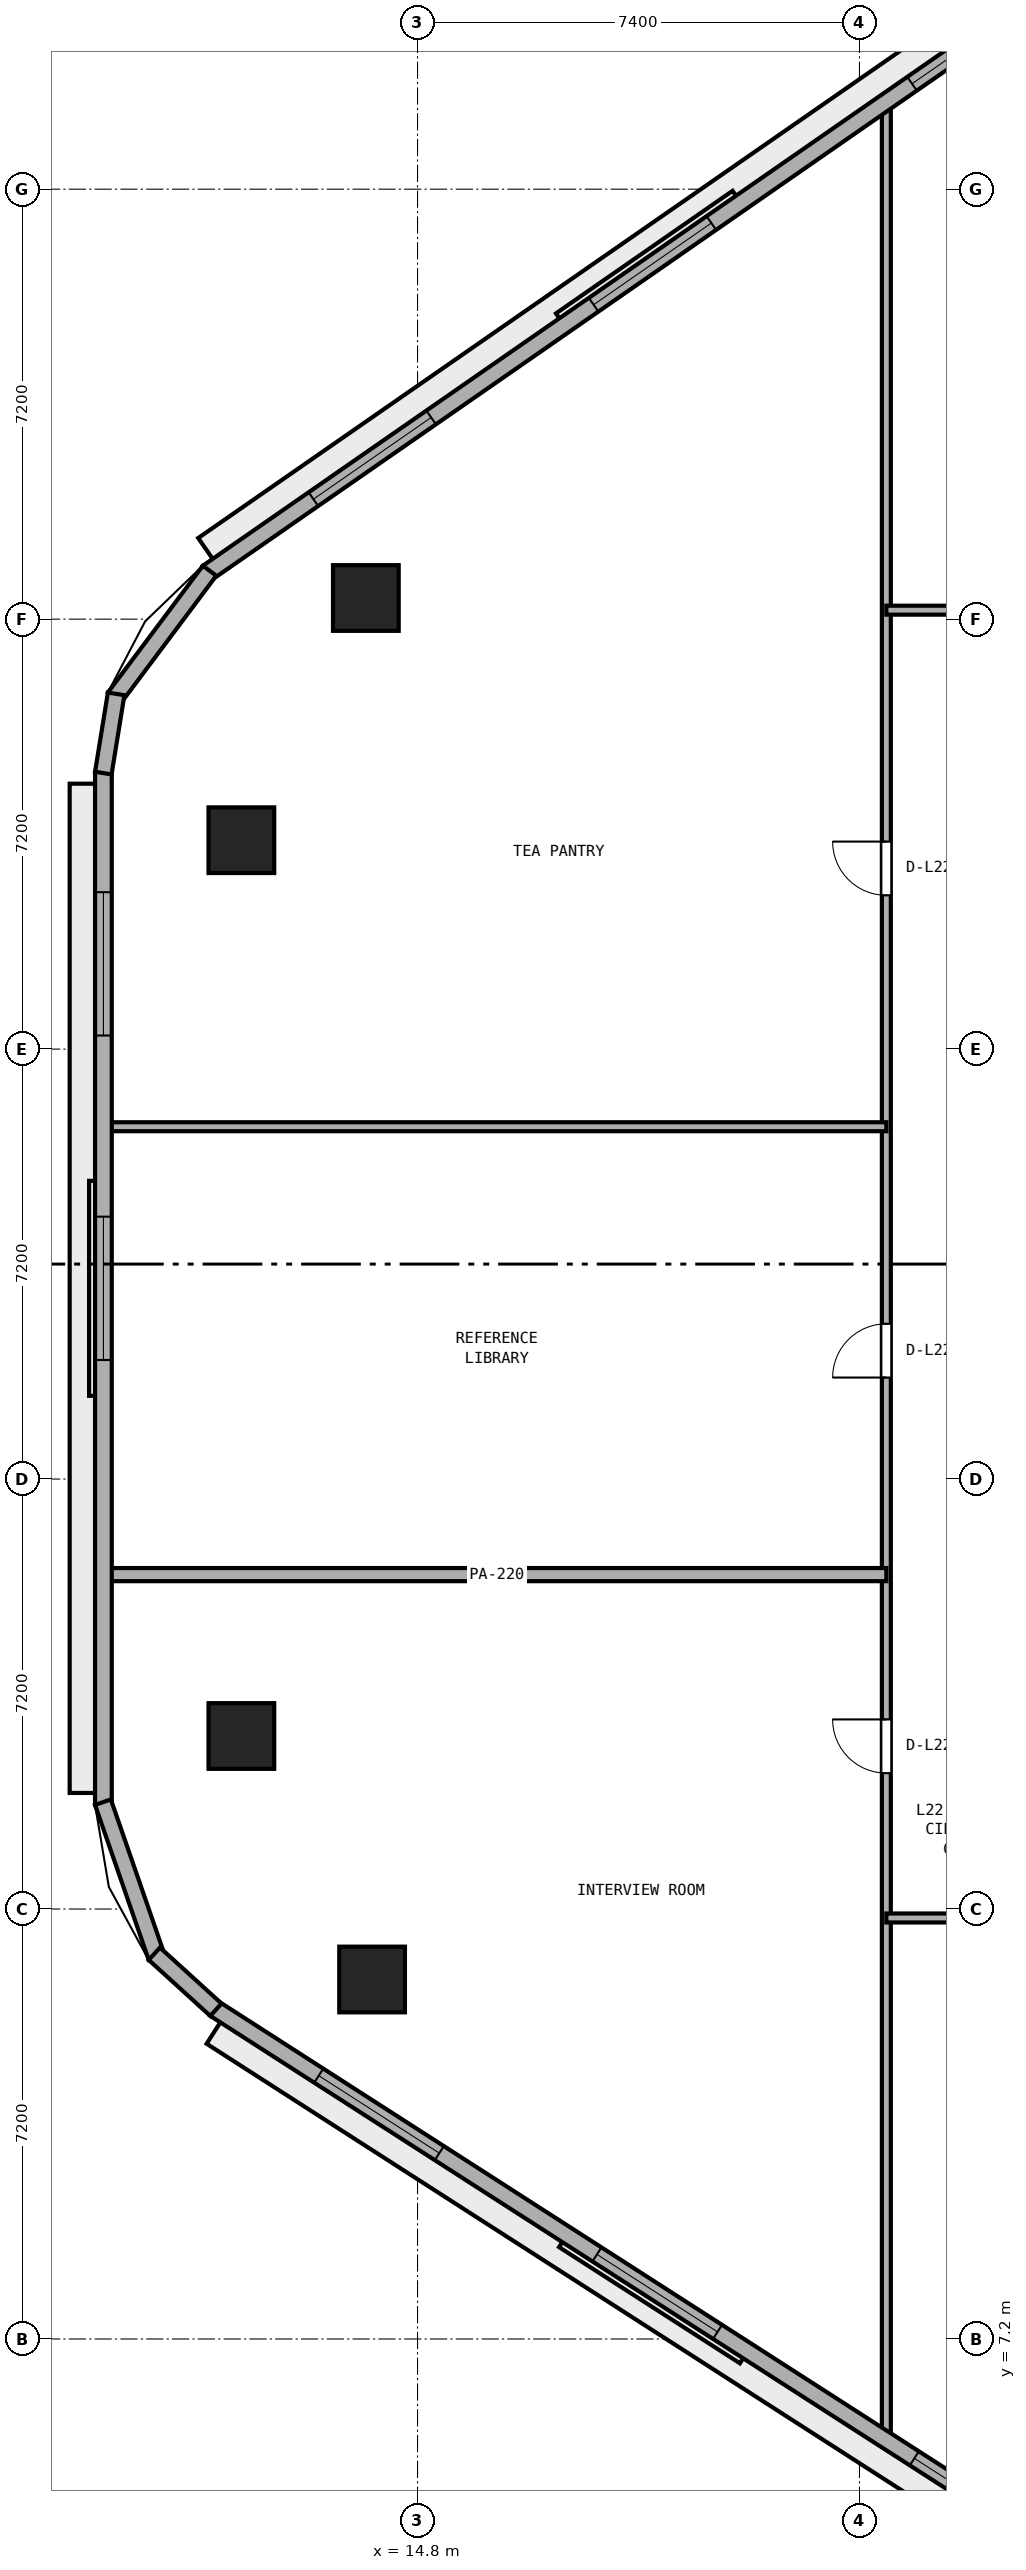
"""IFC4 building model, lengths in metres.
Left out: names, types, materials, properties, quantities, classifications, styles, units other than length and angle.
Written with IfcOpenShell. Run it as: python <this file> out.ifc"""

import sys

from ifc_helpers import new_model, si_unit, direction, frame, frame_2d, origin, origin_2d, place, context, subcontext, project, spatial, rectangle, extrude, element, fill, save


model = new_model("IFC4")
c1 = context("Model", 3, precision=1e-05, world=origin(), true_north=direction((0.0, 1.0)))
c2 = subcontext(c1, "Body", "Model", "MODEL_VIEW")
j1 = project(units=[si_unit("LENGTHUNIT", "METRE"), si_unit("PLANEANGLEUNIT", "RADIAN")], contexts=[c1])
p1 = place(None, origin())
s1 = spatial("IfcSite", under=j1, at=p1, CompositionType="ELEMENT")
p2 = place(p1, origin())
s2 = spatial("IfcBuilding", under=s1, at=p2, CompositionType="ELEMENT")
p3 = place(p2, frame((0.0, 0.0, 89.6)))
s3 = spatial("IfcBuildingStorey", under=s2, at=p3, CompositionType="ELEMENT", Elevation=89.6)
for number, where, z_axis, x_axis in (
    (1, (13.934, 36.354, 0.0), (0.0, 0.0, 1.0), (1.0, 0.0, 0.0)),
    (2, (11.85, 32.298, 0.0), (0.0, 0.0, 1.0), (1.0, 0.0, 0.0)),
    (3, (11.85, 17.298, 0.0), (0.0, 0.0, 1.0), (1.0, 0.0, 0.0)),
    (4, (14.039, 13.22, 0.0), (0.0, 0.0, 1.0), (1.0, 0.0, 0.0)),
):
    element("IfcColumn", number, at=place(p3, frame(where, z_axis=z_axis, x_axis=x_axis)), inside=s3, PredefinedType="COLUMN", context=c2, shape_type="SweptSolid", body=[
        extrude(rectangle(XDim=1.1, YDim=1.1, at=origin_2d()), origin(), (0.0, 0.0, 1.0), 3.8),
    ])
p4 = place(p3, frame((22.65, 5.476, 0.0), z_axis=(0.0, 0.0, 1.0), x_axis=(0.0, 1.0, 0.0)))
e5 = element("IfcWall", 5, at=p4, inside=s3, PredefinedType="PARTITIONING", context=c2, shape_type="SweptSolid", body=[
    extrude(rectangle(XDim=39.221, YDim=0.15, at=frame_2d((19.61, 0.0))), origin(), (0.0, 0.0, 1.0), 3.525),
])
p5 = place(p4, frame((11.199, 0.0, 0.0)))
e6 = element("IfcOpeningElement", 6, at=p5, cuts=e5, PredefinedType="OPENING", context=c2, shape_type="SweptSolid", body=[
    extrude(rectangle(XDim=0.9, YDim=2.1, at=frame_2d((0.45, 1.05))), frame((0.0, 0.085, 0.0), z_axis=(0.0, -1.0, 0.0), x_axis=(1.0, 0.0, 0.0)), (0.0, 0.0, 1.0), 0.17),
])
p6 = place(p4, frame((17.824, 0.0, 0.0)))
e7 = element("IfcOpeningElement", 7, at=p6, cuts=e5, PredefinedType="OPENING", context=c2, shape_type="SweptSolid", body=[
    extrude(rectangle(XDim=0.9, YDim=2.1, at=frame_2d((0.45, 1.05))), frame((0.0, 0.085, 0.0), z_axis=(0.0, -1.0, 0.0), x_axis=(1.0, 0.0, 0.0)), (0.0, 0.0, 1.0), 0.17),
])
p7 = place(p4, frame((25.899, 0.0, 0.0)))
e8 = element("IfcOpeningElement", 8, at=p7, cuts=e5, PredefinedType="OPENING", context=c2, shape_type="SweptSolid", body=[
    extrude(rectangle(XDim=0.9, YDim=2.1, at=frame_2d((0.45, 1.05))), frame((0.0, 0.085, 0.0), z_axis=(0.0, -1.0, 0.0), x_axis=(1.0, 0.0, 0.0)), (0.0, 0.0, 1.0), 0.17),
])
p8 = place(p3, frame((22.65, 14.25, 0.0), z_axis=(0.0, 0.0, 1.0), x_axis=(1.0, 0.0, 0.0)))
e9 = element("IfcWall", 9, at=p8, inside=s3, PredefinedType="PARTITIONING", context=c2, shape_type="SweptSolid", body=[
    extrude(rectangle(XDim=28.7, YDim=0.15, at=frame_2d((14.35, 0.0))), origin(), (0.0, 0.0, 1.0), 3.525),
])
p9 = place(p8, frame((4.845, 0.0, 0.0)))
e10 = element("IfcOpeningElement", 10, at=p9, cuts=e9, PredefinedType="OPENING", context=c2, shape_type="SweptSolid", body=[
    extrude(rectangle(XDim=0.9, YDim=2.1, at=frame_2d((0.45, 1.05))), frame((0.0, 0.085, 0.0), z_axis=(0.0, -1.0, 0.0), x_axis=(1.0, 0.0, 0.0)), (0.0, 0.0, 1.0), 0.17),
])
p10 = place(p8, frame((15.65, 0.0, 0.0)))
e11 = element("IfcOpeningElement", 11, at=p10, cuts=e9, PredefinedType="OPENING", context=c2, shape_type="SweptSolid", body=[
    extrude(rectangle(XDim=0.9, YDim=2.1, at=frame_2d((0.45, 1.05))), frame((0.0, 0.085, 0.0), z_axis=(0.0, -1.0, 0.0), x_axis=(1.0, 0.0, 0.0)), (0.0, 0.0, 1.0), 0.17),
])
p11 = place(p8, frame((24.705, 0.0, 0.0)))
e12 = element("IfcOpeningElement", 12, at=p11, cuts=e9, PredefinedType="OPENING", context=c2, shape_type="SweptSolid", body=[
    extrude(rectangle(XDim=0.9, YDim=2.1, at=frame_2d((0.45, 1.05))), frame((0.0, 0.085, 0.0), z_axis=(0.0, -1.0, 0.0), x_axis=(1.0, 0.0, 0.0)), (0.0, 0.0, 1.0), 0.17),
])
p12 = place(p3, frame((9.605, 20.0, 0.0), z_axis=(0.0, 0.0, 1.0), x_axis=(1.0, 0.0, 0.0)))
e13 = element("IfcWall", 13, at=p12, inside=s3, PredefinedType="PARTITIONING", context=c2, shape_type="SweptSolid", body=[
    extrude(rectangle(XDim=13.045, YDim=0.22, at=frame_2d((6.522, 0.0))), origin(), (0.0, 0.0, 1.0), 3.525),
])
p13 = place(p3, frame((9.605, 27.5, 0.0), z_axis=(0.0, 0.0, 1.0), x_axis=(1.0, 0.0, 0.0)))
e14 = element("IfcWall", 14, at=p13, inside=s3, PredefinedType="PARTITIONING", context=c2, shape_type="SweptSolid", body=[
    extrude(rectangle(XDim=13.045, YDim=0.15, at=frame_2d((6.522, 0.0))), origin(), (0.0, 0.0, 1.0), 3.525),
])
p14 = place(p3, frame((22.65, 36.15, 0.0), z_axis=(0.0, 0.0, 1.0), x_axis=(1.0, 0.0, 0.0)))
e15 = element("IfcWall", 15, at=p14, inside=s3, PredefinedType="PARTITIONING", context=c2, shape_type="SweptSolid", body=[
    extrude(rectangle(XDim=28.7, YDim=0.15, at=frame_2d((14.35, 0.0))), origin(), (0.0, 0.0, 1.0), 3.525),
])
p15 = place(p14, frame((6.095, 0.0, 0.0)))
e16 = element("IfcOpeningElement", 16, at=p15, cuts=e15, PredefinedType="OPENING", context=c2, shape_type="SweptSolid", body=[
    extrude(rectangle(XDim=0.9, YDim=2.1, at=frame_2d((0.45, 1.05))), frame((0.0, 0.085, 0.0), z_axis=(0.0, -1.0, 0.0), x_axis=(1.0, 0.0, 0.0)), (0.0, 0.0, 1.0), 0.17),
])
p16 = place(p14, frame((20.155, 0.0, 0.0)))
e17 = element("IfcOpeningElement", 17, at=p16, cuts=e15, PredefinedType="OPENING", context=c2, shape_type="SweptSolid", body=[
    extrude(rectangle(XDim=1.0, YDim=2.12, at=frame_2d((0.5, 1.06))), frame((0.0, 0.085, 0.0), z_axis=(0.0, -1.0, 0.0), x_axis=(1.0, 0.0, 0.0)), (0.0, 0.0, 1.0), 0.17),
])
p17 = place(p3, frame((26.182, 47.118, 0.0), z_axis=(0.0, 0.0, 1.0), x_axis=(-0.821547956627, -0.570139417127, 0.0)))
e18 = element("IfcWall", 18, at=p17, inside=s3, PredefinedType="STANDARD", context=c2, shape_type="SweptSolid", body=[
    extrude(rectangle(XDim=18.132, YDim=0.28, at=frame_2d((9.066, 0.0))), origin(), (0.0, 0.0, 1.0), 3.525),
])
p18 = place(p17, frame((1.375, 0.0, 0.9)))
e19 = element("IfcOpeningElement", 19, at=p18, cuts=e18, PredefinedType="OPENING", context=c2, shape_type="SweptSolid", body=[
    extrude(rectangle(XDim=2.4, YDim=1.75, at=frame_2d((1.2, 0.875))), frame((0.0, 0.15, 0.0), z_axis=(0.0, -1.0, 0.0), x_axis=(1.0, 0.0, 0.0)), (0.0, 0.0, 1.0), 0.3),
])
p19 = place(p17, frame((7.866, 0.0, 0.9)))
e20 = element("IfcOpeningElement", 20, at=p19, cuts=e18, PredefinedType="OPENING", context=c2, shape_type="SweptSolid", body=[
    extrude(rectangle(XDim=2.4, YDim=1.75, at=frame_2d((1.2, 0.875))), frame((0.0, 0.15, 0.0), z_axis=(0.0, -1.0, 0.0), x_axis=(1.0, 0.0, 0.0)), (0.0, 0.0, 1.0), 0.3),
])
p20 = place(p17, frame((13.577, 0.0, 0.9)))
e21 = element("IfcOpeningElement", 21, at=p20, cuts=e18, PredefinedType="OPENING", context=c2, shape_type="SweptSolid", body=[
    extrude(rectangle(XDim=2.4, YDim=1.75, at=frame_2d((1.2, 0.875))), frame((0.0, 0.15, 0.0), z_axis=(0.0, -1.0, 0.0), x_axis=(1.0, 0.0, 0.0)), (0.0, 0.0, 1.0), 0.3),
])
p21 = place(p3, frame((9.54, 33.444, 0.0), z_axis=(0.0, 0.0, 1.0), x_axis=(0.0, -1.0, 0.0)))
e22 = element("IfcWall", 22, at=p21, inside=s3, PredefinedType="STANDARD", context=c2, shape_type="SweptSolid", body=[
    extrude(rectangle(XDim=17.301, YDim=0.28, at=frame_2d((8.65, 0.0))), origin(), (0.0, 0.0, 1.0), 3.525),
])
p22 = place(p21, frame((2.017, 0.0, 0.9)))
e23 = element("IfcOpeningElement", 23, at=p22, cuts=e22, PredefinedType="OPENING", context=c2, shape_type="SweptSolid", body=[
    extrude(rectangle(XDim=2.4, YDim=1.75, at=frame_2d((1.2, 0.875))), frame((0.0, 0.15, 0.0), z_axis=(0.0, -1.0, 0.0), x_axis=(1.0, 0.0, 0.0)), (0.0, 0.0, 1.0), 0.3),
])
p23 = place(p21, frame((7.45, 0.0, 0.9)))
e24 = element("IfcOpeningElement", 24, at=p23, cuts=e22, PredefinedType="OPENING", context=c2, shape_type="SweptSolid", body=[
    extrude(rectangle(XDim=2.4, YDim=1.75, at=frame_2d((1.2, 0.875))), frame((0.0, 0.15, 0.0), z_axis=(0.0, -1.0, 0.0), x_axis=(1.0, 0.0, 0.0)), (0.0, 0.0, 1.0), 0.3),
])
p24 = place(p3, frame((11.405, 12.728, 0.0), z_axis=(0.0, 0.0, 1.0), x_axis=(0.841304564637, -0.540561402175, 0.0)))
e25 = element("IfcWall", 25, at=p24, inside=s3, PredefinedType="STANDARD", context=c2, shape_type="SweptSolid", body=[
    extrude(rectangle(XDim=17.612, YDim=0.28, at=frame_2d((8.806, 0.0))), origin(), (0.0, 0.0, 1.0), 3.525),
])
p25 = place(p24, frame((2.069, 0.0, 0.9)))
e26 = element("IfcOpeningElement", 26, at=p25, cuts=e25, PredefinedType="OPENING", context=c2, shape_type="SweptSolid", body=[
    extrude(rectangle(XDim=2.4, YDim=1.75, at=frame_2d((1.2, 0.875))), frame((0.0, 0.15, 0.0), z_axis=(0.0, -1.0, 0.0), x_axis=(1.0, 0.0, 0.0)), (0.0, 0.0, 1.0), 0.3),
])
p26 = place(p24, frame((7.606, 0.0, 0.9)))
e27 = element("IfcOpeningElement", 27, at=p26, cuts=e25, PredefinedType="OPENING", context=c2, shape_type="SweptSolid", body=[
    extrude(rectangle(XDim=2.4, YDim=1.75, at=frame_2d((1.2, 0.875))), frame((0.0, 0.15, 0.0), z_axis=(0.0, -1.0, 0.0), x_axis=(1.0, 0.0, 0.0)), (0.0, 0.0, 1.0), 0.3),
])
p27 = place(p24, frame((13.923, 0.0, 0.9)))
e28 = element("IfcOpeningElement", 28, at=p27, cuts=e25, PredefinedType="OPENING", context=c2, shape_type="SweptSolid", body=[
    extrude(rectangle(XDim=2.4, YDim=1.75, at=frame_2d((1.2, 0.875))), frame((0.0, 0.15, 0.0), z_axis=(0.0, -1.0, 0.0), x_axis=(1.0, 0.0, 0.0)), (0.0, 0.0, 1.0), 0.3),
])
p28 = place(p3, frame((11.318, 36.811, 0.0), z_axis=(0.0, 0.0, 1.0), x_axis=(-0.599455152629, -0.800408345775, 0.0)))
e29 = element("IfcWall", 29, at=p28, inside=s3, PredefinedType="STANDARD", context=c2, shape_type="SweptSolid", body=[
    extrude(rectangle(XDim=2.653, YDim=0.28, at=frame_2d((1.327, 0.0))), origin(), (0.0, 0.0, 1.0), 3.525),
])
p29 = place(p3, frame((9.753, 34.749, 0.0), z_axis=(0.0, 0.0, 1.0), x_axis=(-0.160037671962, -0.987110907423, 0.0)))
e30 = element("IfcWall", 30, at=p29, inside=s3, PredefinedType="STANDARD", context=c2, shape_type="SweptSolid", body=[
    extrude(rectangle(XDim=1.344, YDim=0.28, at=frame_2d((0.672, 0.0))), origin(), (0.0, 0.0, 1.0), 3.525),
])
p30 = place(p3, frame((9.532, 16.189, 0.0), z_axis=(0.0, 0.0, 1.0), x_axis=(0.32708309668, -0.944995580871, 0.0)))
e31 = element("IfcWall", 31, at=p30, inside=s3, PredefinedType="STANDARD", context=c2, shape_type="SweptSolid", body=[
    extrude(rectangle(XDim=2.748, YDim=0.28, at=frame_2d((1.374, 0.0))), origin(), (0.0, 0.0, 1.0), 3.525),
])
p31 = place(p3, frame((10.393, 13.651, 0.0), z_axis=(0.0, 0.0, 1.0), x_axis=(0.74003521851, -0.672568119498, 0.0)))
e32 = element("IfcWall", 32, at=p31, inside=s3, PredefinedType="STANDARD", context=c2, shape_type="SweptSolid", body=[
    extrude(rectangle(XDim=1.393, YDim=0.28, at=frame_2d((0.697, 0.0))), origin(), (0.0, 0.0, 1.0), 3.525),
])
p32 = place(p5, origin())
e33 = element("IfcDoor", 33, at=p32, inside=s3, OperationType="SINGLE_SWING_RIGHT", PredefinedType="DOOR", context=c2, shape_type="SweptSolid", body=[
    extrude(rectangle(XDim=0.9, YDim=2.1, at=frame_2d((0.45, 1.05))), frame((0.0, 0.025, 0.0), z_axis=(0.0, -1.0, 0.0), x_axis=(1.0, 0.0, 0.0)), (0.0, 0.0, 1.0), 0.05),
])
fill(e6, e33)
p33 = place(p6, origin())
e34 = element("IfcDoor", 34, at=p33, inside=s3, OperationType="SINGLE_SWING_LEFT", PredefinedType="DOOR", context=c2, shape_type="SweptSolid", body=[
    extrude(rectangle(XDim=0.9, YDim=2.1, at=frame_2d((0.45, 1.05))), frame((0.0, 0.025, 0.0), z_axis=(0.0, -1.0, 0.0), x_axis=(1.0, 0.0, 0.0)), (0.0, 0.0, 1.0), 0.05),
])
fill(e7, e34)
p34 = place(p7, origin())
e35 = element("IfcDoor", 35, at=p34, inside=s3, OperationType="SINGLE_SWING_RIGHT", PredefinedType="DOOR", context=c2, shape_type="SweptSolid", body=[
    extrude(rectangle(XDim=0.9, YDim=2.1, at=frame_2d((0.45, 1.05))), frame((0.0, 0.025, 0.0), z_axis=(0.0, -1.0, 0.0), x_axis=(1.0, 0.0, 0.0)), (0.0, 0.0, 1.0), 0.05),
])
fill(e8, e35)
p35 = place(p18, origin())
e36 = element("IfcWindow", 36, at=p35, inside=s3, PartitioningType="SINGLE_PANEL", PredefinedType="WINDOW", context=c2, shape_type="SweptSolid", body=[
    extrude(rectangle(XDim=2.4, YDim=1.75, at=frame_2d((1.2, 0.875))), frame((0.0, 0.03, 0.0), z_axis=(0.0, -1.0, 0.0), x_axis=(1.0, 0.0, 0.0)), (0.0, 0.0, 1.0), 0.06),
])
fill(e19, e36)
p36 = place(p19, origin())
e37 = element("IfcWindow", 37, at=p36, inside=s3, PartitioningType="SINGLE_PANEL", PredefinedType="WINDOW", context=c2, shape_type="SweptSolid", body=[
    extrude(rectangle(XDim=2.4, YDim=1.75, at=frame_2d((1.2, 0.875))), frame((0.0, 0.03, 0.0), z_axis=(0.0, -1.0, 0.0), x_axis=(1.0, 0.0, 0.0)), (0.0, 0.0, 1.0), 0.06),
])
fill(e20, e37)
p37 = place(p20, origin())
e38 = element("IfcWindow", 38, at=p37, inside=s3, PartitioningType="SINGLE_PANEL", PredefinedType="WINDOW", context=c2, shape_type="SweptSolid", body=[
    extrude(rectangle(XDim=2.4, YDim=1.75, at=frame_2d((1.2, 0.875))), frame((0.0, 0.03, 0.0), z_axis=(0.0, -1.0, 0.0), x_axis=(1.0, 0.0, 0.0)), (0.0, 0.0, 1.0), 0.06),
])
fill(e21, e38)
p38 = place(p22, origin())
e39 = element("IfcWindow", 39, at=p38, inside=s3, PartitioningType="SINGLE_PANEL", PredefinedType="WINDOW", context=c2, shape_type="SweptSolid", body=[
    extrude(rectangle(XDim=2.4, YDim=1.75, at=frame_2d((1.2, 0.875))), frame((0.0, 0.03, 0.0), z_axis=(0.0, -1.0, 0.0), x_axis=(1.0, 0.0, 0.0)), (0.0, 0.0, 1.0), 0.06),
])
fill(e23, e39)
p39 = place(p23, origin())
e40 = element("IfcWindow", 40, at=p39, inside=s3, PartitioningType="SINGLE_PANEL", PredefinedType="WINDOW", context=c2, shape_type="SweptSolid", body=[
    extrude(rectangle(XDim=2.4, YDim=1.75, at=frame_2d((1.2, 0.875))), frame((0.0, 0.03, 0.0), z_axis=(0.0, -1.0, 0.0), x_axis=(1.0, 0.0, 0.0)), (0.0, 0.0, 1.0), 0.06),
])
fill(e24, e40)
p40 = place(p25, origin())
e41 = element("IfcWindow", 41, at=p40, inside=s3, PartitioningType="SINGLE_PANEL", PredefinedType="WINDOW", context=c2, shape_type="SweptSolid", body=[
    extrude(rectangle(XDim=2.4, YDim=1.75, at=frame_2d((1.2, 0.875))), frame((0.0, 0.03, 0.0), z_axis=(0.0, -1.0, 0.0), x_axis=(1.0, 0.0, 0.0)), (0.0, 0.0, 1.0), 0.06),
])
fill(e26, e41)
p41 = place(p26, origin())
e42 = element("IfcWindow", 42, at=p41, inside=s3, PartitioningType="SINGLE_PANEL", PredefinedType="WINDOW", context=c2, shape_type="SweptSolid", body=[
    extrude(rectangle(XDim=2.4, YDim=1.75, at=frame_2d((1.2, 0.875))), frame((0.0, 0.03, 0.0), z_axis=(0.0, -1.0, 0.0), x_axis=(1.0, 0.0, 0.0)), (0.0, 0.0, 1.0), 0.06),
])
fill(e27, e42)
p42 = place(p27, origin())
e43 = element("IfcWindow", 43, at=p42, inside=s3, PartitioningType="SINGLE_PANEL", PredefinedType="WINDOW", context=c2, shape_type="SweptSolid", body=[
    extrude(rectangle(XDim=2.4, YDim=1.75, at=frame_2d((1.2, 0.875))), frame((0.0, 0.03, 0.0), z_axis=(0.0, -1.0, 0.0), x_axis=(1.0, 0.0, 0.0)), (0.0, 0.0, 1.0), 0.06),
])
fill(e28, e43)
save(model, sys.argv[1])
